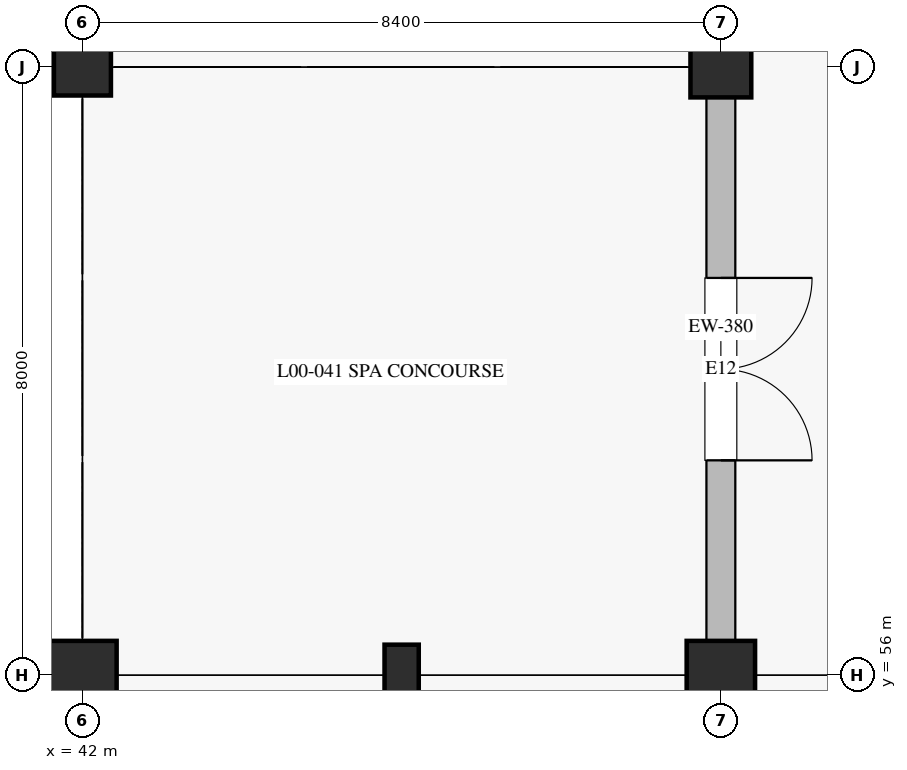
"""IFC4 building model, lengths in metres.
Left out: names, types, materials, properties, quantities, classifications, styles, units other than length and angle.
Written with IfcOpenShell. Run it as: python <this file> out.ifc"""

import sys

from ifc_helpers import new_model, si_unit, direction, frame, frame_2d, origin, origin_2d, place, context, subcontext, project, spatial, rectangle, extrude, element, fill, save


model = new_model("IFC4")
c1 = context("Model", 3, precision=1e-05, world=origin(), true_north=direction((0.0, 1.0)))
c2 = subcontext(c1, "Body", "Model", "MODEL_VIEW")
j1 = project(units=[si_unit("LENGTHUNIT", "METRE"), si_unit("PLANEANGLEUNIT", "RADIAN")], contexts=[c1])
p1 = place(None, origin())
s1 = spatial("IfcSite", under=j1, at=p1, CompositionType="ELEMENT")
p2 = place(p1, origin())
s2 = spatial("IfcBuilding", under=s1, at=p2, CompositionType="ELEMENT")
p3 = place(p2, origin())
s3 = spatial("IfcBuildingStorey", under=s2, at=p3, CompositionType="ELEMENT", Elevation=0.0)
p4 = place(p3, frame((42.0, 56.0, 0.0), z_axis=(0.0, 0.0, 1.0), x_axis=(1.0, 0.0, 0.0)))
e1 = element("IfcColumn", 1, at=p4, inside=s3, PredefinedType="COLUMN", context=c2, shape_type="SweptSolid", body=[
    extrude(rectangle(XDim=0.9, YDim=0.9, at=origin_2d()), origin(), (0.0, 0.0, 1.0), 6.0),
])
p5 = place(p3, frame((42.0, 64.0, 0.0), z_axis=(0.0, 0.0, 1.0), x_axis=(1.0, 0.0, 0.0)))
e2 = element("IfcColumn", 2, at=p5, inside=s3, PredefinedType="COLUMN", context=c2, shape_type="SweptSolid", body=[
    extrude(rectangle(XDim=0.75, YDim=0.75, at=origin_2d()), origin(), (0.0, 0.0, 1.0), 6.0),
])
p6 = place(p3, frame((46.2, 56.0, 0.0), z_axis=(0.0, 0.0, 1.0), x_axis=(1.0, 0.0, 0.0)))
e3 = element("IfcColumn", 3, at=p6, inside=s3, PredefinedType="PILASTER", context=c2, shape_type="SweptSolid", body=[
    extrude(rectangle(XDim=0.45, YDim=0.8, at=origin_2d()), origin(), (0.0, 0.0, 1.0), 6.0),
])
p7 = place(p3, frame((50.4, 56.0, 0.0), z_axis=(0.0, 0.0, 1.0), x_axis=(1.0, 0.0, 0.0)))
e4 = element("IfcColumn", 4, at=p7, inside=s3, PredefinedType="COLUMN", context=c2, shape_type="SweptSolid", body=[
    extrude(rectangle(XDim=0.9, YDim=0.9, at=origin_2d()), origin(), (0.0, 0.0, 1.0), 6.0),
])
p8 = place(p3, frame((50.4, 64.0, 0.0), z_axis=(0.0, 0.0, 1.0), x_axis=(1.0, 0.0, 0.0)))
e5 = element("IfcColumn", 5, at=p8, inside=s3, PredefinedType="COLUMN", context=c2, shape_type="SweptSolid", body=[
    extrude(rectangle(XDim=0.8, YDim=0.8, at=origin_2d()), origin(), (0.0, 0.0, 1.0), 6.0),
])
p9 = place(p3, frame((50.4, 63.6, 0.0), z_axis=(0.0, 0.0, 1.0), x_axis=(0.0, -1.0, 0.0)))
e6 = element("IfcWall", 6, at=p9, inside=s3, PredefinedType="SOLIDWALL", context=c2, shape_type="SweptSolid", body=[
    extrude(rectangle(XDim=7.15, YDim=0.38, at=frame_2d((3.575, 0.0))), origin(), (0.0, 0.0, 1.0), 5.0),
])
p10 = place(p9, frame((2.375, 0.0, 0.0)))
e7 = element("IfcOpeningElement", 7, at=p10, cuts=e6, PredefinedType="OPENING", context=c2, shape_type="SweptSolid", body=[
    extrude(rectangle(XDim=2.4, YDim=2.6, at=frame_2d((1.2, 1.3))), frame((0.0, 0.2, 0.0), z_axis=(0.0, -1.0, 0.0), x_axis=(1.0, 0.0, 0.0)), (0.0, 0.0, 1.0), 0.4),
])
p11 = place(p10, origin())
e8 = element("IfcDoor", 8, at=p11, inside=s3, OperationType="DOUBLE_DOOR_SINGLE_SWING", PredefinedType="DOOR", context=c2, shape_type="SweptSolid", body=[
    extrude(rectangle(XDim=2.4, YDim=2.6, at=frame_2d((1.2, 1.3))), frame((0.0, 0.025, 0.0), z_axis=(0.0, -1.0, 0.0), x_axis=(1.0, 0.0, 0.0)), (0.0, 0.0, 1.0), 0.05),
])
fill(e7, e8)
save(model, sys.argv[1])
